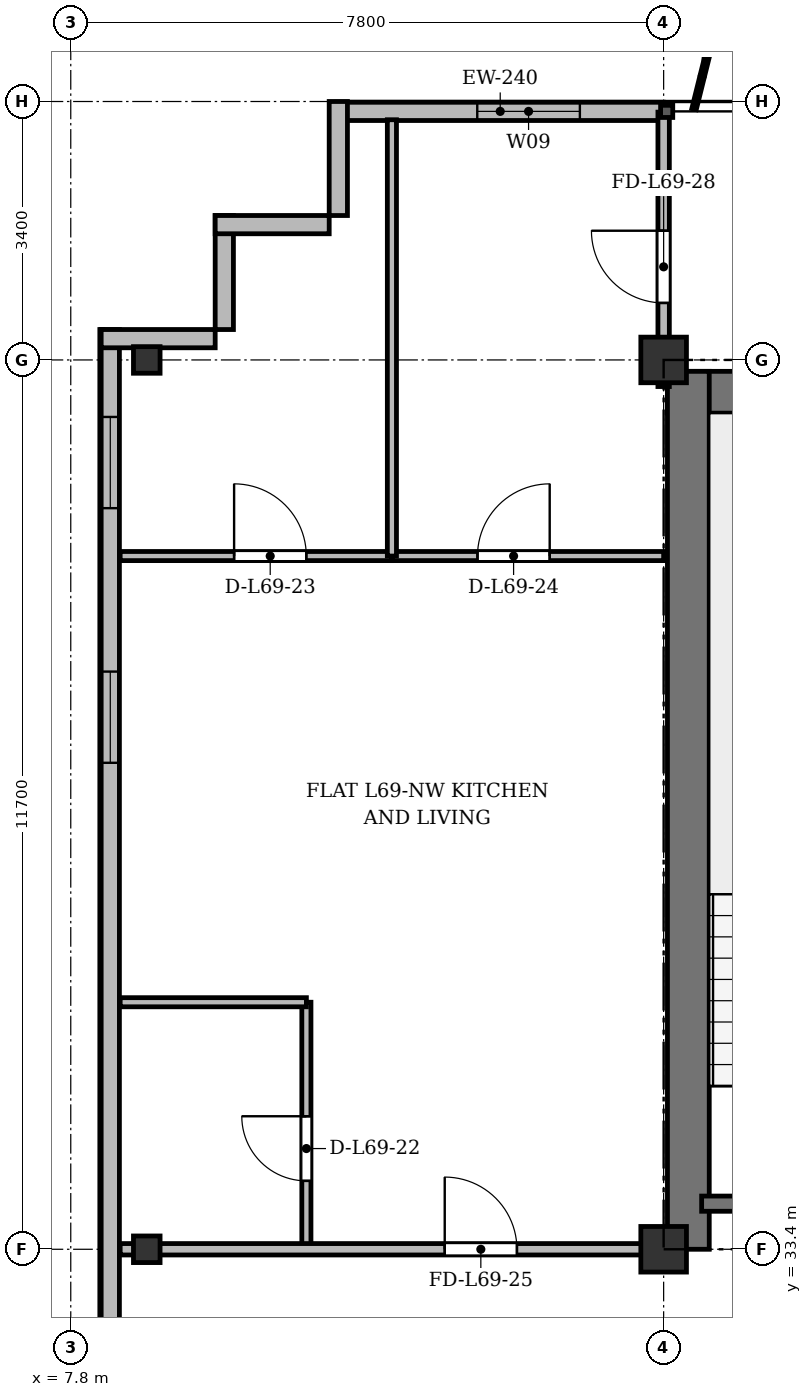
"""IFC4 building model, lengths in metres.
Left out: names, types, materials, properties, quantities, classifications, styles, units other than length and angle.
Written with IfcOpenShell. Run it as: python <this file> out.ifc"""

import sys

from ifc_helpers import new_model, si_unit, direction, frame, frame_2d, origin, origin_2d, place, context, subcontext, project, spatial, rectangle, i_section, extrude, source, transform, mapped, element, fill, save


model = new_model("IFC4")
c1 = context("Model", 3, precision=1e-05, world=origin(), true_north=direction((0.0, 1.0)))
c2 = subcontext(c1, "Body", "Model", "MODEL_VIEW")
j1 = project(units=[si_unit("LENGTHUNIT", "METRE"), si_unit("PLANEANGLEUNIT", "RADIAN")], contexts=[c1])
p1 = place(None, origin())
s1 = spatial("IfcSite", under=j1, at=p1, CompositionType="ELEMENT")
p2 = place(p1, origin())
s2 = spatial("IfcBuilding", under=s1, at=p2, CompositionType="ELEMENT")
p3 = place(p2, frame((0.0, 0.0, 266.7)))
s3 = spatial("IfcBuildingStorey", under=s2, at=p3, CompositionType="ELEMENT", Elevation=266.7)
m1 = source(origin(), c2, "Body", "SweptSolid", [
    extrude(i_section(OverallWidth=0.35, OverallDepth=0.35, WebThickness=0.018, FlangeThickness=0.028, at=origin_2d()), origin(), (0.0, 0.0, 1.0), 3.6),
])
for number, where, z_axis, x_axis in (
    (1, (8.8, 33.4, 0.0), (0.0, 0.0, 1.0), (1.0, 0.0, 0.0)),
    (2, (8.8, 45.1, 0.0), (0.0, 0.0, 1.0), (1.0, 0.0, 0.0)),
):
    element("IfcColumn", number, at=place(p3, frame(where, z_axis=z_axis, x_axis=x_axis)), inside=s3, PredefinedType="COLUMN", context=c2, shape_type="MappedRepresentation", body=[
        mapped(m1, transform((0.0, 0.0, 0.0), x_axis=(1.0, 0.0, 0.0), y_axis=(0.0, 1.0, 0.0), z_axis=(0.0, 0.0, 1.0), scale=1.0)),
    ])
m2 = source(origin(), c2, "Body", "SweptSolid", [
    extrude(rectangle(XDim=0.6, YDim=0.6, at=origin_2d()), origin(), (0.0, 0.0, 1.0), 3.6),
])
for number, where, z_axis, x_axis in (
    (3, (15.6, 33.4, 0.0), (0.0, 0.0, 1.0), (1.0, 0.0, 0.0)),
    (4, (15.6, 45.1, 0.0), (0.0, 0.0, 1.0), (1.0, 0.0, 0.0)),
):
    element("IfcColumn", number, at=place(p3, frame(where, z_axis=z_axis, x_axis=x_axis)), inside=s3, PredefinedType="COLUMN", context=c2, shape_type="MappedRepresentation", body=[
        mapped(m2, transform((0.0, 0.0, 0.0), x_axis=(1.0, 0.0, 0.0), y_axis=(0.0, 1.0, 0.0), z_axis=(0.0, 0.0, 1.0), scale=1.0)),
    ])
p4 = place(p3, frame((11.3, 48.37, 0.0), z_axis=(0.0, 0.0, 1.0), x_axis=(1.0, 0.0, 0.0)))
e5 = element("IfcWall", 5, at=p4, inside=s3, PredefinedType="SOLIDWALL", context=c2, shape_type="SweptSolid", body=[
    extrude(rectangle(XDim=4.3, YDim=0.24, at=frame_2d((2.15, 0.0))), origin(), (0.0, 0.0, 1.0), 3.37),
])
p5 = place(p4, frame((1.848, 0.0, 0.9)))
e6 = element("IfcOpeningElement", 6, at=p5, cuts=e5, PredefinedType="OPENING", context=c2, shape_type="SweptSolid", body=[
    extrude(rectangle(XDim=1.35, YDim=1.5, at=frame_2d((0.675, 0.75))), frame((0.0, 0.13, 0.0), z_axis=(0.0, -1.0, 0.0), x_axis=(1.0, 0.0, 0.0)), (0.0, 0.0, 1.0), 0.26),
])
p6 = place(p3, frame((8.32, 6.5, 0.0), z_axis=(0.0, 0.0, 1.0), x_axis=(0.0, 1.0, 0.0)))
e7 = element("IfcWall", 7, at=p6, inside=s3, PredefinedType="SOLIDWALL", context=c2, shape_type="SweptSolid", body=[
    extrude(rectangle(XDim=39.0, YDim=0.24, at=frame_2d((19.5, 0.0))), origin(), (0.0, 0.0, 1.0), 3.37),
])
p7 = place(p6, frame((1.45, 0.0, 0.92)))
e8 = element("IfcOpeningElement", 8, at=p7, cuts=e7, PredefinedType="OPENING", context=c2, shape_type="SweptSolid", body=[
    extrude(rectangle(XDim=1.2, YDim=1.65, at=frame_2d((0.6, 0.825))), frame((0.0, 0.13, 0.0), z_axis=(0.0, -1.0, 0.0), x_axis=(1.0, 0.0, 0.0)), (0.0, 0.0, 1.0), 0.26),
])
p8 = place(p6, frame((3.7, 0.0, 0.92)))
e9 = element("IfcOpeningElement", 9, at=p8, cuts=e7, PredefinedType="OPENING", context=c2, shape_type="SweptSolid", body=[
    extrude(rectangle(XDim=2.4, YDim=2.1, at=frame_2d((1.2, 1.05))), frame((0.0, 0.13, 0.0), z_axis=(0.0, -1.0, 0.0), x_axis=(1.0, 0.0, 0.0)), (0.0, 0.0, 1.0), 0.26),
])
p9 = place(p6, frame((7.9, 0.0, 0.92)))
e10 = element("IfcOpeningElement", 10, at=p9, cuts=e7, PredefinedType="OPENING", context=c2, shape_type="SweptSolid", body=[
    extrude(rectangle(XDim=2.4, YDim=2.1, at=frame_2d((1.2, 1.05))), frame((0.0, 0.13, 0.0), z_axis=(0.0, -1.0, 0.0), x_axis=(1.0, 0.0, 0.0)), (0.0, 0.0, 1.0), 0.26),
])
p10 = place(p6, frame((15.1, 0.0, 0.92)))
e11 = element("IfcOpeningElement", 11, at=p10, cuts=e7, PredefinedType="OPENING", context=c2, shape_type="SweptSolid", body=[
    extrude(rectangle(XDim=2.4, YDim=2.1, at=frame_2d((1.2, 1.05))), frame((0.0, 0.13, 0.0), z_axis=(0.0, -1.0, 0.0), x_axis=(1.0, 0.0, 0.0)), (0.0, 0.0, 1.0), 0.26),
])
p11 = place(p6, frame((33.3, 0.0, 0.92)))
e12 = element("IfcOpeningElement", 12, at=p11, cuts=e7, PredefinedType="OPENING", context=c2, shape_type="SweptSolid", body=[
    extrude(rectangle(XDim=1.2, YDim=1.65, at=frame_2d((0.6, 0.825))), frame((0.0, 0.13, 0.0), z_axis=(0.0, -1.0, 0.0), x_axis=(1.0, 0.0, 0.0)), (0.0, 0.0, 1.0), 0.26),
])
p12 = place(p6, frame((36.65, 0.0, 0.92)))
e13 = element("IfcOpeningElement", 13, at=p12, cuts=e7, PredefinedType="OPENING", context=c2, shape_type="SweptSolid", body=[
    extrude(rectangle(XDim=1.2, YDim=1.65, at=frame_2d((0.6, 0.825))), frame((0.0, 0.13, 0.0), z_axis=(0.0, -1.0, 0.0), x_axis=(1.0, 0.0, 0.0)), (0.0, 0.0, 1.0), 0.26),
])
for number, where, z_axis, x_axis in (
    (14, (8.2, 45.38, 0.0), (0.0, 0.0, 1.0), (1.0, 0.0, 0.0)),
    (15, (9.82, 45.5, 0.0), (0.0, 0.0, 1.0), (0.0, 1.0, 0.0)),
    (16, (9.7, 46.88, 0.0), (0.0, 0.0, 1.0), (1.0, 0.0, 0.0)),
    (17, (11.32, 47.0, 0.0), (0.0, 0.0, 1.0), (0.0, 1.0, 0.0)),
):
    element("IfcWall", number, at=place(p3, frame(where, z_axis=z_axis, x_axis=x_axis)), inside=s3, PredefinedType="SOLIDWALL", context=c2, shape_type="SweptSolid", body=[
        extrude(rectangle(XDim=1.5, YDim=0.24, at=frame_2d((0.75, 0.0))), origin(), (0.0, 0.0, 1.0), 3.37),
    ])
p13 = place(p3, frame((15.65, 44.675, 0.0), z_axis=(0.0, 0.0, 1.0), x_axis=(1.0, 0.0, 0.0)))
e18 = element("IfcWall", 18, at=p13, inside=s3, PredefinedType="SHEAR", context=c2, shape_type="SweptSolid", body=[
    extrude(rectangle(XDim=43.1, YDim=0.55, at=frame_2d((21.55, 0.0))), origin(), (0.0, 0.0, 1.0), 3.37),
])
p14 = place(p3, frame((15.925, 33.4, 0.0), z_axis=(0.0, 0.0, 1.0), x_axis=(0.0, 1.0, 0.0)))
e19 = element("IfcWall", 19, at=p14, inside=s3, PredefinedType="SHEAR", context=c2, shape_type="SweptSolid", body=[
    extrude(rectangle(XDim=11.55, YDim=0.55, at=frame_2d((5.775, 0.0))), origin(), (0.0, 0.0, 1.0), 3.37),
])
p15 = place(p3, frame((16.1, 34.0, 0.0), z_axis=(0.0, 0.0, 1.0), x_axis=(1.0, 0.0, 0.0)))
e20 = element("IfcWall", 20, at=p15, inside=s3, PredefinedType="SHEAR", context=c2, shape_type="SweptSolid", body=[
    extrude(rectangle(XDim=3.4, YDim=0.2, at=frame_2d((1.7, 0.0))), origin(), (0.0, 0.0, 1.0), 3.37),
])
p16 = place(p3, frame((10.9, 33.4, 0.0), z_axis=(0.0, 0.0, 1.0), x_axis=(0.0, 1.0, 0.0)))
e21 = element("IfcWall", 21, at=p16, inside=s3, PredefinedType="PARTITIONING", context=c2, shape_type="SweptSolid", body=[
    extrude(rectangle(XDim=3.25, YDim=0.12, at=frame_2d((1.625, 0.0))), origin(), (0.0, 0.0, 1.0), 2.92),
])
p17 = place(p16, frame((0.9, 0.0, 0.0)))
e22 = element("IfcOpeningElement", 22, at=p17, cuts=e21, PredefinedType="OPENING", context=c2, shape_type="SweptSolid", body=[
    extrude(rectangle(XDim=0.85, YDim=2.1, at=frame_2d((0.425, 1.05))), frame((0.0, 0.07, 0.0), z_axis=(0.0, -1.0, 0.0), x_axis=(1.0, 0.0, 0.0)), (0.0, 0.0, 1.0), 0.14),
])
p18 = place(p3, frame((8.45, 36.65, 0.0), z_axis=(0.0, 0.0, 1.0), x_axis=(1.0, 0.0, 0.0)))
e23 = element("IfcWall", 23, at=p18, inside=s3, PredefinedType="PARTITIONING", context=c2, shape_type="SweptSolid", body=[
    extrude(rectangle(XDim=2.45, YDim=0.12, at=frame_2d((1.225, 0.0))), origin(), (0.0, 0.0, 1.0), 2.87),
])
p19 = place(p3, frame((8.45, 42.52, 0.0), z_axis=(0.0, 0.0, 1.0), x_axis=(1.0, 0.0, 0.0)))
e24 = element("IfcWall", 24, at=p19, inside=s3, PredefinedType="PARTITIONING", context=c2, shape_type="SweptSolid", body=[
    extrude(rectangle(XDim=3.575, YDim=0.12, at=frame_2d((1.788, 0.0))), origin(), (0.0, 0.0, 1.0), 2.87),
])
p20 = place(p19, frame((1.499, 0.0, 0.0)))
e25 = element("IfcOpeningElement", 25, at=p20, cuts=e24, PredefinedType="OPENING", context=c2, shape_type="SweptSolid", body=[
    extrude(rectangle(XDim=0.95, YDim=2.15, at=frame_2d((0.475, 1.075))), frame((0.0, 0.07, 0.0), z_axis=(0.0, -1.0, 0.0), x_axis=(1.0, 0.0, 0.0)), (0.0, 0.0, 1.0), 0.14),
])
p21 = place(p3, frame((12.025, 42.52, 0.0), z_axis=(0.0, 0.0, 1.0), x_axis=(1.0, 0.0, 0.0)))
e26 = element("IfcWall", 26, at=p21, inside=s3, PredefinedType="PARTITIONING", context=c2, shape_type="SweptSolid", body=[
    extrude(rectangle(XDim=3.575, YDim=0.12, at=frame_2d((1.788, 0.0))), origin(), (0.0, 0.0, 1.0), 2.87),
])
p22 = place(p21, frame((1.126, 0.0, 0.0)))
e27 = element("IfcOpeningElement", 27, at=p22, cuts=e26, PredefinedType="OPENING", context=c2, shape_type="SweptSolid", body=[
    extrude(rectangle(XDim=0.95, YDim=2.15, at=frame_2d((0.475, 1.075))), frame((0.0, 0.07, 0.0), z_axis=(0.0, -1.0, 0.0), x_axis=(1.0, 0.0, 0.0)), (0.0, 0.0, 1.0), 0.14),
])
p23 = place(p3, frame((12.025, 42.52, 0.0), z_axis=(0.0, 0.0, 1.0), x_axis=(0.0, 1.0, 0.0)))
e28 = element("IfcWall", 28, at=p23, inside=s3, PredefinedType="PARTITIONING", context=c2, shape_type="SweptSolid", body=[
    extrude(rectangle(XDim=5.74, YDim=0.12, at=frame_2d((2.87, 0.0))), origin(), (0.0, 0.0, 1.0), 2.92),
])
p24 = place(p3, frame((8.45, 33.4, 0.0), z_axis=(0.0, 0.0, 1.0), x_axis=(1.0, 0.0, 0.0)))
e29 = element("IfcWall", 29, at=p24, inside=s3, PredefinedType="PARTITIONING", context=c2, shape_type="SweptSolid", body=[
    extrude(rectangle(XDim=7.15, YDim=0.15, at=frame_2d((3.575, 0.0))), origin(), (0.0, 0.0, 1.0), 2.92),
])
p25 = place(p24, frame((4.27, 0.0, 0.0)))
e30 = element("IfcOpeningElement", 30, at=p25, cuts=e29, PredefinedType="OPENING", context=c2, shape_type="SweptSolid", body=[
    extrude(rectangle(XDim=0.95, YDim=2.15, at=frame_2d((0.475, 1.075))), frame((0.0, 0.085, 0.0), z_axis=(0.0, -1.0, 0.0), x_axis=(1.0, 0.0, 0.0)), (0.0, 0.0, 1.0), 0.17),
])
p26 = place(p3, frame((15.6, 44.75, 0.0), z_axis=(0.0, 0.0, 1.0), x_axis=(0.0, 1.0, 0.0)))
e31 = element("IfcWall", 31, at=p26, inside=s3, PredefinedType="PARTITIONING", context=c2, shape_type="SweptSolid", body=[
    extrude(rectangle(XDim=3.61, YDim=0.15, at=frame_2d((1.805, 0.0))), origin(), (0.0, 0.0, 1.0), 2.87),
])
p27 = place(p26, frame((1.1, 0.0, 0.0)))
e32 = element("IfcOpeningElement", 32, at=p27, cuts=e31, PredefinedType="OPENING", context=c2, shape_type="SweptSolid", body=[
    extrude(rectangle(XDim=0.95, YDim=2.15, at=frame_2d((0.475, 1.075))), frame((0.0, 0.085, 0.0), z_axis=(0.0, -1.0, 0.0), x_axis=(1.0, 0.0, 0.0)), (0.0, 0.0, 1.0), 0.17),
])
m3 = source(origin(), c2, "Body", "SweptSolid", [
    extrude(rectangle(XDim=1.35, YDim=1.5, at=frame_2d((0.675, 0.75))), frame((0.0, 0.03, 0.0), z_axis=(0.0, -1.0, 0.0), x_axis=(1.0, 0.0, 0.0)), (0.0, 0.0, 1.0), 0.06),
])
p28 = place(p5, origin())
e33 = element("IfcWindow", 33, at=p28, inside=s3, PartitioningType="SINGLE_PANEL", PredefinedType="WINDOW", context=c2, shape_type="MappedRepresentation", body=[
    mapped(m3, transform((0.0, 0.0, 0.0), x_axis=(1.0, 0.0, 0.0), y_axis=(0.0, 1.0, 0.0), z_axis=(0.0, 0.0, 1.0), scale=1.0)),
])
fill(e6, e33)
m4 = source(origin(), c2, "Body", "SweptSolid", [
    extrude(rectangle(XDim=1.2, YDim=1.65, at=frame_2d((0.6, 0.825))), frame((0.0, 0.03, 0.0), z_axis=(0.0, -1.0, 0.0), x_axis=(1.0, 0.0, 0.0)), (0.0, 0.0, 1.0), 0.06),
])
p29 = place(p11, origin())
e34 = element("IfcWindow", 34, at=p29, inside=s3, PartitioningType="SINGLE_PANEL", PredefinedType="WINDOW", context=c2, shape_type="MappedRepresentation", body=[
    mapped(m4, transform((0.0, 0.0, 0.0), x_axis=(1.0, 0.0, 0.0), y_axis=(0.0, 1.0, 0.0), z_axis=(0.0, 0.0, 1.0), scale=1.0)),
])
fill(e12, e34)
p30 = place(p12, origin())
e35 = element("IfcWindow", 35, at=p30, inside=s3, PartitioningType="SINGLE_PANEL", PredefinedType="WINDOW", context=c2, shape_type="MappedRepresentation", body=[
    mapped(m4, transform((0.0, 0.0, 0.0), x_axis=(1.0, 0.0, 0.0), y_axis=(0.0, 1.0, 0.0), z_axis=(0.0, 0.0, 1.0), scale=1.0)),
])
fill(e13, e35)
m5 = source(origin(), c2, "Body", "SweptSolid", [
    extrude(rectangle(XDim=0.85, YDim=2.1, at=frame_2d((0.425, 1.05))), frame((0.0, 0.025, 0.0), z_axis=(0.0, -1.0, 0.0), x_axis=(1.0, 0.0, 0.0)), (0.0, 0.0, 1.0), 0.05),
])
p31 = place(p17, origin())
e36 = element("IfcDoor", 36, at=p31, inside=s3, OperationType="SINGLE_SWING_RIGHT", PredefinedType="DOOR", context=c2, shape_type="MappedRepresentation", body=[
    mapped(m5, transform((0.0, 0.0, 0.0), x_axis=(1.0, 0.0, 0.0), y_axis=(0.0, 1.0, 0.0), z_axis=(0.0, 0.0, 1.0), scale=1.0)),
])
fill(e22, e36)
m6 = source(origin(), c2, "Body", "SweptSolid", [
    extrude(rectangle(XDim=0.95, YDim=2.15, at=frame_2d((0.475, 1.075))), frame((0.0, 0.025, 0.0), z_axis=(0.0, -1.0, 0.0), x_axis=(1.0, 0.0, 0.0)), (0.0, 0.0, 1.0), 0.05),
])
p32 = place(p20, origin())
e37 = element("IfcDoor", 37, at=p32, inside=s3, OperationType="SINGLE_SWING_LEFT", PredefinedType="DOOR", context=c2, shape_type="MappedRepresentation", body=[
    mapped(m6, transform((0.0, 0.0, 0.0), x_axis=(1.0, 0.0, 0.0), y_axis=(0.0, 1.0, 0.0), z_axis=(0.0, 0.0, 1.0), scale=1.0)),
])
fill(e25, e37)
p33 = place(p22, origin())
e38 = element("IfcDoor", 38, at=p33, inside=s3, OperationType="SINGLE_SWING_RIGHT", PredefinedType="DOOR", context=c2, shape_type="MappedRepresentation", body=[
    mapped(m6, transform((0.0, 0.0, 0.0), x_axis=(1.0, 0.0, 0.0), y_axis=(0.0, 1.0, 0.0), z_axis=(0.0, 0.0, 1.0), scale=1.0)),
])
fill(e27, e38)
p34 = place(p25, origin())
e39 = element("IfcDoor", 39, at=p34, inside=s3, OperationType="SINGLE_SWING_LEFT", PredefinedType="DOOR", context=c2, shape_type="MappedRepresentation", body=[
    mapped(m6, transform((0.0, 0.0, 0.0), x_axis=(1.0, 0.0, 0.0), y_axis=(0.0, 1.0, 0.0), z_axis=(0.0, 0.0, 1.0), scale=1.0)),
])
fill(e30, e39)
p35 = place(p27, origin())
e40 = element("IfcDoor", 40, at=p35, inside=s3, OperationType="SINGLE_SWING_RIGHT", PredefinedType="DOOR", context=c2, shape_type="MappedRepresentation", body=[
    mapped(m6, transform((0.0, 0.0, 0.0), x_axis=(1.0, 0.0, 0.0), y_axis=(0.0, 1.0, 0.0), z_axis=(0.0, 0.0, 1.0), scale=1.0)),
])
fill(e32, e40)
save(model, sys.argv[1])
